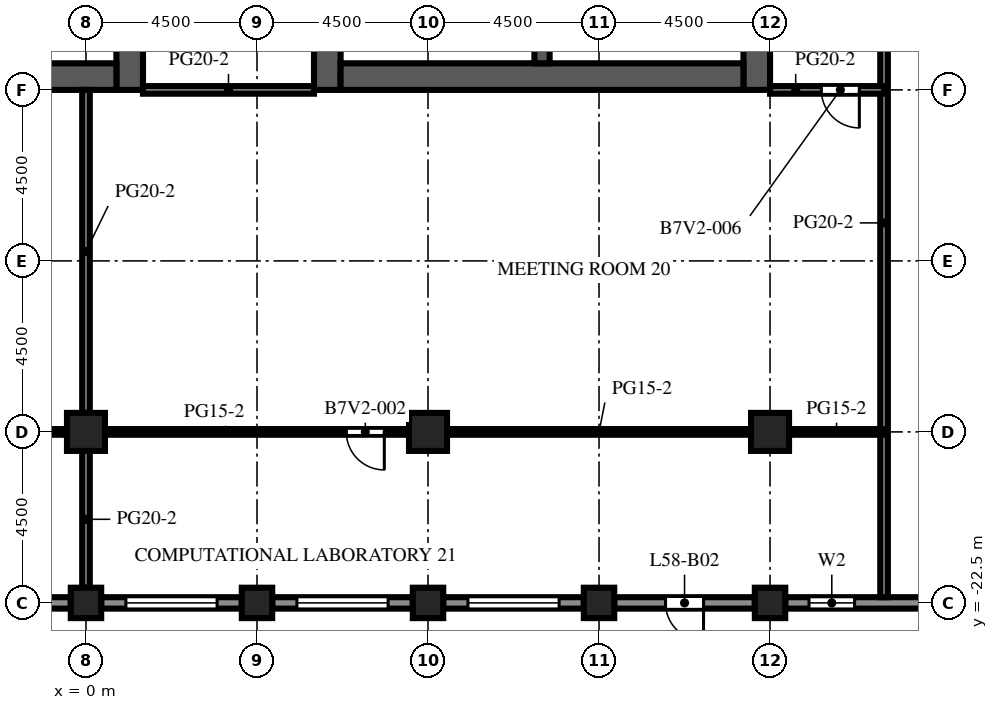
"""IFC4 building model, lengths in metres.
Left out: names, types, materials, properties, quantities, classifications, styles, units other than length and angle.
Written with IfcOpenShell. Run it as: python <this file> out.ifc"""

import sys

from ifc_helpers import new_model, si_unit, direction, frame, frame_2d, origin, origin_2d, place, context, subcontext, project, spatial, rectangle, extrude, element, fill, save


model = new_model("IFC4")
c1 = context("Model", 3, precision=1e-05, world=origin(), true_north=direction((0.0, 1.0)))
c2 = subcontext(c1, "Body", "Model", "MODEL_VIEW")
j1 = project(units=[si_unit("LENGTHUNIT", "METRE"), si_unit("PLANEANGLEUNIT", "RADIAN")], contexts=[c1])
p1 = place(None, origin())
s1 = spatial("IfcSite", under=j1, at=p1, CompositionType="ELEMENT")
p2 = place(p1, origin())
s2 = spatial("IfcBuilding", under=s1, at=p2, CompositionType="ELEMENT")
p3 = place(p2, frame((0.0, 0.0, 256.2)))
s3 = spatial("IfcBuildingStorey", under=s2, at=p3, CompositionType="ELEMENT", Elevation=256.2)
for number, where, z_axis, x_axis in (
    (1, (0.0, -22.5, 0.0), (0.0, 0.0, 1.0), (1.0, 0.0, 0.0)),
    (2, (4.5, -22.5, 0.0), (0.0, 0.0, 1.0), (1.0, 0.0, 0.0)),
    (3, (9.0, -22.5, 0.0), (0.0, 0.0, 1.0), (1.0, 0.0, 0.0)),
    (4, (13.5, -22.5, 0.0), (0.0, 0.0, 1.0), (1.0, 0.0, 0.0)),
    (5, (18.0, -22.5, 0.0), (0.0, 0.0, 1.0), (1.0, 0.0, 0.0)),
):
    element("IfcColumn", number, at=place(p3, frame(where, z_axis=z_axis, x_axis=x_axis)), inside=s3, PredefinedType="COLUMN", context=c2, shape_type="SweptSolid", body=[
        extrude(rectangle(XDim=0.8, YDim=0.8, at=origin_2d()), origin(), (0.0, 0.0, 1.0), 4.1),
    ])
for number, where, z_axis, x_axis in (
    (6, (0.0, -18.0, 0.0), (0.0, 0.0, 1.0), (1.0, 0.0, 0.0)),
    (7, (9.0, -18.0, 0.0), (0.0, 0.0, 1.0), (1.0, 0.0, 0.0)),
    (8, (18.0, -18.0, 0.0), (0.0, 0.0, 1.0), (1.0, 0.0, 0.0)),
):
    element("IfcColumn", number, at=place(p3, frame(where, z_axis=z_axis, x_axis=x_axis)), inside=s3, PredefinedType="COLUMN", context=c2, shape_type="SweptSolid", body=[
        extrude(rectangle(XDim=1.0, YDim=1.0, at=origin_2d()), origin(), (0.0, 0.0, 1.0), 4.1),
    ])
p4 = place(p3, frame((1.15, -9.0, 0.0), z_axis=(0.0, 0.0, 1.0), x_axis=(0.0, 1.0, 0.0)))
e9 = element("IfcWall", 9, at=p4, inside=s3, PredefinedType="SHEAR", context=c2, shape_type="SweptSolid", body=[
    extrude(rectangle(XDim=27.5, YDim=0.7, at=frame_2d((13.75, 0.0))), origin(), (0.0, 0.0, 1.0), 4.1),
])
p5 = place(p4, frame((12.55, 0.0, 0.0)))
e10 = element("IfcOpeningElement", 10, at=p5, cuts=e9, PredefinedType="OPENING", context=c2, shape_type="SweptSolid", body=[
    extrude(rectangle(XDim=2.4, YDim=2.4, at=frame_2d((1.2, 1.2))), frame((0.0, 0.36, 0.0), z_axis=(0.0, -1.0, 0.0), x_axis=(1.0, 0.0, 0.0)), (0.0, 0.0, 1.0), 0.72),
])
p6 = place(p4, frame((3.788, 0.0, 0.0)))
e11 = element("IfcOpeningElement", 11, at=p6, cuts=e9, PredefinedType="OPENING", context=c2, shape_type="SweptSolid", body=[
    extrude(rectangle(XDim=0.968, YDim=2.1, at=frame_2d((0.484, 1.05))), frame((0.0, 0.36, 0.0), z_axis=(0.0, -1.0, 0.0), x_axis=(1.0, 0.0, 0.0)), (0.0, 0.0, 1.0), 0.72),
])
p7 = place(p4, frame((23.54, 0.0, 0.0)))
e12 = element("IfcOpeningElement", 12, at=p7, cuts=e9, PredefinedType="OPENING", context=c2, shape_type="SweptSolid", body=[
    extrude(rectangle(XDim=1.2, YDim=2.1, at=frame_2d((0.6, 1.05))), frame((0.0, 0.36, 0.0), z_axis=(0.0, -1.0, 0.0), x_axis=(1.0, 0.0, 0.0)), (0.0, 0.0, 1.0), 0.72),
])
p8 = place(p3, frame((-9.8, -8.65, 0.0), z_axis=(0.0, 0.0, 1.0), x_axis=(1.0, 0.0, 0.0)))
e13 = element("IfcWall", 13, at=p8, inside=s3, PredefinedType="SHEAR", context=c2, shape_type="SweptSolid", body=[
    extrude(rectangle(XDim=10.6, YDim=0.7, at=frame_2d((5.3, 0.0))), origin(), (0.0, 0.0, 1.0), 4.1),
])
p9 = place(p3, frame((6.35, -9.0, 0.0), z_axis=(0.0, 0.0, 1.0), x_axis=(0.0, 1.0, 0.0)))
e14 = element("IfcWall", 14, at=p9, inside=s3, PredefinedType="SHEAR", context=c2, shape_type="SweptSolid", body=[
    extrude(rectangle(XDim=27.5, YDim=0.7, at=frame_2d((13.75, 0.0))), origin(), (0.0, 0.0, 1.0), 4.1),
])
p10 = place(p9, frame((12.55, 0.0, 0.0)))
e15 = element("IfcOpeningElement", 15, at=p10, cuts=e14, PredefinedType="OPENING", context=c2, shape_type="SweptSolid", body=[
    extrude(rectangle(XDim=2.4, YDim=2.4, at=frame_2d((1.2, 1.2))), frame((0.0, 0.36, 0.0), z_axis=(0.0, -1.0, 0.0), x_axis=(1.0, 0.0, 0.0)), (0.0, 0.0, 1.0), 0.72),
])
p11 = place(p9, frame((3.788, 0.0, 0.0)))
e16 = element("IfcOpeningElement", 16, at=p11, cuts=e14, PredefinedType="OPENING", context=c2, shape_type="SweptSolid", body=[
    extrude(rectangle(XDim=0.968, YDim=2.1, at=frame_2d((0.484, 1.05))), frame((0.0, 0.36, 0.0), z_axis=(0.0, -1.0, 0.0), x_axis=(1.0, 0.0, 0.0)), (0.0, 0.0, 1.0), 0.72),
])
p12 = place(p9, frame((23.54, 0.0, 0.0)))
e17 = element("IfcOpeningElement", 17, at=p12, cuts=e14, PredefinedType="OPENING", context=c2, shape_type="SweptSolid", body=[
    extrude(rectangle(XDim=1.2, YDim=2.1, at=frame_2d((0.6, 1.05))), frame((0.0, 0.36, 0.0), z_axis=(0.0, -1.0, 0.0), x_axis=(1.0, 0.0, 0.0)), (0.0, 0.0, 1.0), 0.72),
])
p13 = place(p3, frame((17.65, -9.0, 0.0), z_axis=(0.0, 0.0, 1.0), x_axis=(0.0, 1.0, 0.0)))
e18 = element("IfcWall", 18, at=p13, inside=s3, PredefinedType="SHEAR", context=c2, shape_type="SweptSolid", body=[
    extrude(rectangle(XDim=27.5, YDim=0.7, at=frame_2d((13.75, 0.0))), origin(), (0.0, 0.0, 1.0), 4.1),
])
p14 = place(p13, frame((12.55, 0.0, 0.0)))
e19 = element("IfcOpeningElement", 19, at=p14, cuts=e18, PredefinedType="OPENING", context=c2, shape_type="SweptSolid", body=[
    extrude(rectangle(XDim=2.4, YDim=2.4, at=frame_2d((1.2, 1.2))), frame((0.0, 0.36, 0.0), z_axis=(0.0, -1.0, 0.0), x_axis=(1.0, 0.0, 0.0)), (0.0, 0.0, 1.0), 0.72),
])
p15 = place(p13, frame((6.825, 0.0, 0.0)))
e20 = element("IfcOpeningElement", 20, at=p15, cuts=e18, PredefinedType="OPENING", context=c2, shape_type="SweptSolid", body=[
    extrude(rectangle(XDim=1.2, YDim=2.1, at=frame_2d((0.6, 1.05))), frame((0.0, 0.36, 0.0), z_axis=(0.0, -1.0, 0.0), x_axis=(1.0, 0.0, 0.0)), (0.0, 0.0, 1.0), 0.72),
])
p16 = place(p13, frame((19.475, 0.0, 0.0)))
e21 = element("IfcOpeningElement", 21, at=p16, cuts=e18, PredefinedType="OPENING", context=c2, shape_type="SweptSolid", body=[
    extrude(rectangle(XDim=1.2, YDim=2.1, at=frame_2d((0.6, 1.05))), frame((0.0, 0.36, 0.0), z_axis=(0.0, -1.0, 0.0), x_axis=(1.0, 0.0, 0.0)), (0.0, 0.0, 1.0), 0.72),
])
p17 = place(p3, frame((6.7, -8.65, 0.0), z_axis=(0.0, 0.0, 1.0), x_axis=(1.0, 0.0, 0.0)))
e22 = element("IfcWall", 22, at=p17, inside=s3, PredefinedType="SHEAR", context=c2, shape_type="SweptSolid", body=[
    extrude(rectangle(XDim=10.6, YDim=0.7, at=frame_2d((5.3, 0.0))), origin(), (0.0, 0.0, 1.0), 4.1),
])
p18 = place(p3, frame((12.0, -8.3, 0.0), z_axis=(0.0, 0.0, 1.0), x_axis=(0.0, 1.0, 0.0)))
e23 = element("IfcWall", 23, at=p18, inside=s3, PredefinedType="SHEAR", context=c2, shape_type="SweptSolid", body=[
    extrude(rectangle(XDim=7.6, YDim=0.4, at=frame_2d((3.8, 0.0))), origin(), (0.0, 0.0, 1.0), 4.1),
])
p19 = place(p3, frame((-0.4, -22.5, 0.0), z_axis=(0.0, 0.0, 1.0), x_axis=(-1.0, 0.0, 0.0)))
e24 = element("IfcWall", 24, at=p19, inside=s3, PredefinedType="SOLIDWALL", context=c2, shape_type="SweptSolid", body=[
    extrude(rectangle(XDim=3.7, YDim=0.3, at=frame_2d((1.85, 0.0))), origin(), (0.0, 0.0, 1.0), 2.7),
])
p20 = place(p19, frame((0.65, 0.0, 0.8)))
e25 = element("IfcOpeningElement", 25, at=p20, cuts=e24, PredefinedType="OPENING", context=c2, shape_type="SweptSolid", body=[
    extrude(rectangle(XDim=2.4, YDim=1.7, at=frame_2d((1.2, 0.85))), frame((0.0, 0.16, 0.0), z_axis=(0.0, -1.0, 0.0), x_axis=(1.0, 0.0, 0.0)), (0.0, 0.0, 1.0), 0.32),
])
p21 = place(p3, frame((4.1, -22.5, 0.0), z_axis=(0.0, 0.0, 1.0), x_axis=(-1.0, 0.0, 0.0)))
e26 = element("IfcWall", 26, at=p21, inside=s3, PredefinedType="SOLIDWALL", context=c2, shape_type="SweptSolid", body=[
    extrude(rectangle(XDim=3.7, YDim=0.3, at=frame_2d((1.85, 0.0))), origin(), (0.0, 0.0, 1.0), 2.7),
])
p22 = place(p21, frame((0.65, 0.0, 0.8)))
e27 = element("IfcOpeningElement", 27, at=p22, cuts=e26, PredefinedType="OPENING", context=c2, shape_type="SweptSolid", body=[
    extrude(rectangle(XDim=2.4, YDim=1.7, at=frame_2d((1.2, 0.85))), frame((0.0, 0.16, 0.0), z_axis=(0.0, -1.0, 0.0), x_axis=(1.0, 0.0, 0.0)), (0.0, 0.0, 1.0), 0.32),
])
p23 = place(p3, frame((8.6, -22.5, 0.0), z_axis=(0.0, 0.0, 1.0), x_axis=(-1.0, 0.0, 0.0)))
e28 = element("IfcWall", 28, at=p23, inside=s3, PredefinedType="SOLIDWALL", context=c2, shape_type="SweptSolid", body=[
    extrude(rectangle(XDim=3.7, YDim=0.3, at=frame_2d((1.85, 0.0))), origin(), (0.0, 0.0, 1.0), 2.7),
])
p24 = place(p23, frame((0.65, 0.0, 0.8)))
e29 = element("IfcOpeningElement", 29, at=p24, cuts=e28, PredefinedType="OPENING", context=c2, shape_type="SweptSolid", body=[
    extrude(rectangle(XDim=2.4, YDim=1.7, at=frame_2d((1.2, 0.85))), frame((0.0, 0.16, 0.0), z_axis=(0.0, -1.0, 0.0), x_axis=(1.0, 0.0, 0.0)), (0.0, 0.0, 1.0), 0.32),
])
p25 = place(p3, frame((13.1, -22.5, 0.0), z_axis=(0.0, 0.0, 1.0), x_axis=(-1.0, 0.0, 0.0)))
e30 = element("IfcWall", 30, at=p25, inside=s3, PredefinedType="SOLIDWALL", context=c2, shape_type="SweptSolid", body=[
    extrude(rectangle(XDim=3.7, YDim=0.3, at=frame_2d((1.85, 0.0))), origin(), (0.0, 0.0, 1.0), 2.7),
])
p26 = place(p25, frame((0.65, 0.0, 0.8)))
e31 = element("IfcOpeningElement", 31, at=p26, cuts=e30, PredefinedType="OPENING", context=c2, shape_type="SweptSolid", body=[
    extrude(rectangle(XDim=2.4, YDim=1.7, at=frame_2d((1.2, 0.85))), frame((0.0, 0.16, 0.0), z_axis=(0.0, -1.0, 0.0), x_axis=(1.0, 0.0, 0.0)), (0.0, 0.0, 1.0), 0.32),
])
p27 = place(p3, frame((17.6, -22.5, 0.0), z_axis=(0.0, 0.0, 1.0), x_axis=(-1.0, 0.0, 0.0)))
e32 = element("IfcWall", 32, at=p27, inside=s3, PredefinedType="SOLIDWALL", context=c2, shape_type="SweptSolid", body=[
    extrude(rectangle(XDim=3.7, YDim=0.3, at=frame_2d((1.85, 0.0))), origin(), (0.0, 0.0, 1.0), 2.7),
])
p28 = place(p27, frame((1.35, 0.0, 0.0)))
e33 = element("IfcOpeningElement", 33, at=p28, cuts=e32, PredefinedType="OPENING", context=c2, shape_type="SweptSolid", body=[
    extrude(rectangle(XDim=1.0, YDim=2.2, at=frame_2d((0.5, 1.1))), frame((0.0, 0.16, 0.0), z_axis=(0.0, -1.0, 0.0), x_axis=(1.0, 0.0, 0.0)), (0.0, 0.0, 1.0), 0.32),
])
p29 = place(p3, frame((22.1, -22.5, 0.0), z_axis=(0.0, 0.0, 1.0), x_axis=(-1.0, 0.0, 0.0)))
e34 = element("IfcWall", 34, at=p29, inside=s3, PredefinedType="SOLIDWALL", context=c2, shape_type="SweptSolid", body=[
    extrude(rectangle(XDim=3.7, YDim=0.3, at=frame_2d((1.85, 0.0))), origin(), (0.0, 0.0, 1.0), 2.7),
])
p30 = place(p29, frame((1.875, 0.0, 0.8)))
e35 = element("IfcOpeningElement", 35, at=p30, cuts=e34, PredefinedType="OPENING", context=c2, shape_type="SweptSolid", body=[
    extrude(rectangle(XDim=1.2, YDim=1.7, at=frame_2d((0.6, 0.85))), frame((0.0, 0.16, 0.0), z_axis=(0.0, -1.0, 0.0), x_axis=(1.0, 0.0, 0.0)), (0.0, 0.0, 1.0), 0.32),
])
p31 = place(p3, frame((0.0, -22.1, 0.0), z_axis=(0.0, 0.0, 1.0), x_axis=(0.0, 1.0, 0.0)))
e36 = element("IfcWall", 36, at=p31, inside=s3, PredefinedType="PARTITIONING", context=c2, shape_type="SweptSolid", body=[
    extrude(rectangle(XDim=3.6, YDim=0.2, at=frame_2d((1.8, 0.0))), origin(), (0.0, 0.0, 1.0), 3.5),
])
p32 = place(p3, frame((0.0, -17.5, 0.0), z_axis=(0.0, 0.0, 1.0), x_axis=(0.0, 1.0, 0.0)))
e37 = element("IfcWall", 37, at=p32, inside=s3, PredefinedType="PARTITIONING", context=c2, shape_type="SweptSolid", body=[
    extrude(rectangle(XDim=8.5, YDim=0.2, at=frame_2d((4.25, 0.0))), origin(), (0.0, 0.0, 1.0), 3.5),
])
p33 = place(p3, frame((21.0, 3.25, 0.0), z_axis=(0.0, 0.0, 1.0), x_axis=(0.0, -1.0, 0.0)))
e38 = element("IfcWall", 38, at=p33, inside=s3, PredefinedType="PARTITIONING", context=c2, shape_type="SweptSolid", body=[
    extrude(rectangle(XDim=25.6, YDim=0.2, at=frame_2d((12.8, 0.0))), origin(), (0.0, 0.0, 1.0), 3.5),
])
p34 = place(p33, frame((4.9, 0.0, 0.0)))
e39 = element("IfcOpeningElement", 39, at=p34, cuts=e38, PredefinedType="OPENING", context=c2, shape_type="SweptSolid", body=[
    extrude(rectangle(XDim=1.0, YDim=2.1, at=frame_2d((0.5, 1.05))), frame((0.0, 0.11, 0.0), z_axis=(0.0, -1.0, 0.0), x_axis=(1.0, 0.0, 0.0)), (0.0, 0.0, 1.0), 0.22),
])
p35 = place(p3, frame((-0.5, -18.0, 0.0), z_axis=(0.0, 0.0, 1.0), x_axis=(-1.0, 0.0, 0.0)))
e40 = element("IfcWall", 40, at=p35, inside=s3, PredefinedType="PARTITIONING", context=c2, shape_type="SweptSolid", body=[
    extrude(rectangle(XDim=8.0, YDim=0.15, at=frame_2d((4.0, 0.0))), origin(), (0.0, 0.0, 1.0), 3.5),
])
p36 = place(p35, frame((4.9, 0.0, 0.0)))
e41 = element("IfcOpeningElement", 41, at=p36, cuts=e40, PredefinedType="OPENING", context=c2, shape_type="SweptSolid", body=[
    extrude(rectangle(XDim=1.0, YDim=2.1, at=frame_2d((0.5, 1.05))), frame((0.0, 0.085, 0.0), z_axis=(0.0, -1.0, 0.0), x_axis=(1.0, 0.0, 0.0)), (0.0, 0.0, 1.0), 0.17),
])
p37 = place(p3, frame((8.5, -18.0, 0.0), z_axis=(0.0, 0.0, 1.0), x_axis=(-1.0, 0.0, 0.0)))
e42 = element("IfcWall", 42, at=p37, inside=s3, PredefinedType="PARTITIONING", context=c2, shape_type="SweptSolid", body=[
    extrude(rectangle(XDim=8.0, YDim=0.15, at=frame_2d((4.0, 0.0))), origin(), (0.0, 0.0, 1.0), 3.5),
])
p38 = place(p37, frame((0.65, 0.0, 0.0)))
e43 = element("IfcOpeningElement", 43, at=p38, cuts=e42, PredefinedType="OPENING", context=c2, shape_type="SweptSolid", body=[
    extrude(rectangle(XDim=1.0, YDim=2.1, at=frame_2d((0.5, 1.05))), frame((0.0, 0.085, 0.0), z_axis=(0.0, -1.0, 0.0), x_axis=(1.0, 0.0, 0.0)), (0.0, 0.0, 1.0), 0.17),
])
p39 = place(p3, frame((9.5, -18.0, 0.0), z_axis=(0.0, 0.0, 1.0), x_axis=(1.0, 0.0, 0.0)))
e44 = element("IfcWall", 44, at=p39, inside=s3, PredefinedType="PARTITIONING", context=c2, shape_type="SweptSolid", body=[
    extrude(rectangle(XDim=8.0, YDim=0.15, at=frame_2d((4.0, 0.0))), origin(), (0.0, 0.0, 1.0), 3.5),
])
p40 = place(p3, frame((18.5, -18.0, 0.0), z_axis=(0.0, 0.0, 1.0), x_axis=(1.0, 0.0, 0.0)))
e45 = element("IfcWall", 45, at=p40, inside=s3, PredefinedType="PARTITIONING", context=c2, shape_type="SweptSolid", body=[
    extrude(rectangle(XDim=2.5, YDim=0.15, at=frame_2d((1.25, 0.0))), origin(), (0.0, 0.0, 1.0), 3.5),
])
p41 = place(p3, frame((1.5, -9.0, 0.0), z_axis=(0.0, 0.0, 1.0), x_axis=(1.0, 0.0, 0.0)))
e46 = element("IfcWall", 46, at=p41, inside=s3, PredefinedType="PARTITIONING", context=c2, shape_type="SweptSolid", body=[
    extrude(rectangle(XDim=4.5, YDim=0.2, at=frame_2d((2.25, 0.0))), origin(), (0.0, 0.0, 1.0), 3.5),
])
p42 = place(p3, frame((21.0, -9.0, 0.0), z_axis=(0.0, 0.0, 1.0), x_axis=(-1.0, 0.0, 0.0)))
e47 = element("IfcWall", 47, at=p42, inside=s3, PredefinedType="PARTITIONING", context=c2, shape_type="SweptSolid", body=[
    extrude(rectangle(XDim=3.0, YDim=0.2, at=frame_2d((1.5, 0.0))), origin(), (0.0, 0.0, 1.0), 3.5),
])
p43 = place(p42, frame((0.65, 0.0, 0.0)))
e48 = element("IfcOpeningElement", 48, at=p43, cuts=e47, PredefinedType="OPENING", context=c2, shape_type="SweptSolid", body=[
    extrude(rectangle(XDim=1.0, YDim=2.1, at=frame_2d((0.5, 1.05))), frame((0.0, 0.11, 0.0), z_axis=(0.0, -1.0, 0.0), x_axis=(1.0, 0.0, 0.0)), (0.0, 0.0, 1.0), 0.22),
])
p44 = place(p22, origin())
e49 = element("IfcWindow", 49, at=p44, inside=s3, PartitioningType="SINGLE_PANEL", PredefinedType="WINDOW", context=c2, shape_type="SweptSolid", body=[
    extrude(rectangle(XDim=2.4, YDim=1.7, at=frame_2d((1.2, 0.85))), frame((0.0, 0.03, 0.0), z_axis=(0.0, -1.0, 0.0), x_axis=(1.0, 0.0, 0.0)), (0.0, 0.0, 1.0), 0.06),
])
fill(e27, e49)
p45 = place(p24, origin())
e50 = element("IfcWindow", 50, at=p45, inside=s3, PartitioningType="SINGLE_PANEL", PredefinedType="WINDOW", context=c2, shape_type="SweptSolid", body=[
    extrude(rectangle(XDim=2.4, YDim=1.7, at=frame_2d((1.2, 0.85))), frame((0.0, 0.03, 0.0), z_axis=(0.0, -1.0, 0.0), x_axis=(1.0, 0.0, 0.0)), (0.0, 0.0, 1.0), 0.06),
])
fill(e29, e50)
p46 = place(p26, origin())
e51 = element("IfcWindow", 51, at=p46, inside=s3, PartitioningType="SINGLE_PANEL", PredefinedType="WINDOW", context=c2, shape_type="SweptSolid", body=[
    extrude(rectangle(XDim=2.4, YDim=1.7, at=frame_2d((1.2, 0.85))), frame((0.0, 0.03, 0.0), z_axis=(0.0, -1.0, 0.0), x_axis=(1.0, 0.0, 0.0)), (0.0, 0.0, 1.0), 0.06),
])
fill(e31, e51)
p47 = place(p28, origin())
e52 = element("IfcDoor", 52, at=p47, inside=s3, OperationType="SINGLE_SWING_LEFT", PredefinedType="DOOR", context=c2, shape_type="SweptSolid", body=[
    extrude(rectangle(XDim=1.0, YDim=2.2, at=frame_2d((0.5, 1.1))), frame((0.0, 0.025, 0.0), z_axis=(0.0, -1.0, 0.0), x_axis=(1.0, 0.0, 0.0)), (0.0, 0.0, 1.0), 0.05),
])
fill(e33, e52)
p48 = place(p30, origin())
e53 = element("IfcWindow", 53, at=p48, inside=s3, PartitioningType="SINGLE_PANEL", PredefinedType="WINDOW", context=c2, shape_type="SweptSolid", body=[
    extrude(rectangle(XDim=1.2, YDim=1.7, at=frame_2d((0.6, 0.85))), frame((0.0, 0.03, 0.0), z_axis=(0.0, -1.0, 0.0), x_axis=(1.0, 0.0, 0.0)), (0.0, 0.0, 1.0), 0.06),
])
fill(e35, e53)
p49 = place(p38, origin())
e54 = element("IfcDoor", 54, at=p49, inside=s3, OperationType="SINGLE_SWING_LEFT", PredefinedType="DOOR", context=c2, shape_type="SweptSolid", body=[
    extrude(rectangle(XDim=1.0, YDim=2.1, at=frame_2d((0.5, 1.05))), frame((0.0, 0.025, 0.0), z_axis=(0.0, -1.0, 0.0), x_axis=(1.0, 0.0, 0.0)), (0.0, 0.0, 1.0), 0.05),
])
fill(e43, e54)
p50 = place(p43, origin())
e55 = element("IfcDoor", 55, at=p50, inside=s3, OperationType="SINGLE_SWING_LEFT", PredefinedType="DOOR", context=c2, shape_type="SweptSolid", body=[
    extrude(rectangle(XDim=1.0, YDim=2.1, at=frame_2d((0.5, 1.05))), frame((0.0, 0.025, 0.0), z_axis=(0.0, -1.0, 0.0), x_axis=(1.0, 0.0, 0.0)), (0.0, 0.0, 1.0), 0.05),
])
fill(e48, e55)
save(model, sys.argv[1])
